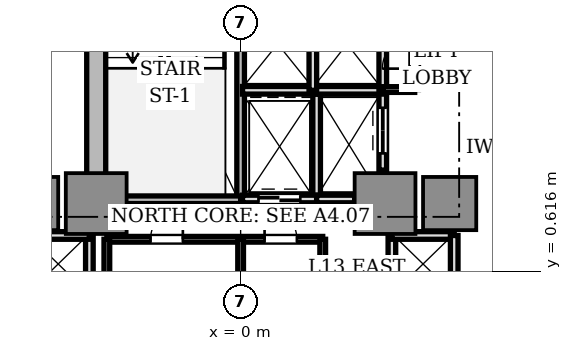
"""IFC4 building model, lengths in metres.
Left out: names, types, materials, properties, quantities, classifications, styles, units other than length and angle.
Written with IfcOpenShell. Run it as: python <this file> out.ifc"""

import sys

from ifc_helpers import new_model, si_unit, direction, frame, frame_2d, origin, origin_2d, place, context, subcontext, project, spatial, rectangle, extrude, source, transform, mapped, element, fill, save


model = new_model("IFC4")
c1 = context("Model", 3, precision=1e-05, world=origin(), true_north=direction((0.0, 1.0)))
c2 = subcontext(c1, "Body", "Model", "MODEL_VIEW")
j1 = project(units=[si_unit("LENGTHUNIT", "METRE"), si_unit("PLANEANGLEUNIT", "RADIAN")], contexts=[c1])
p1 = place(None, origin())
s1 = spatial("IfcSite", under=j1, at=p1, CompositionType="ELEMENT")
p2 = place(p1, origin())
s2 = spatial("IfcBuilding", under=s1, at=p2, CompositionType="ELEMENT")
p3 = place(p2, frame((0.0, 0.0, 51.05)))
s3 = spatial("IfcBuildingStorey", under=s2, at=p3, CompositionType="ELEMENT", Elevation=51.05)
p4 = place(p3, frame((-3.8, 2.85, 0.0), z_axis=(0.0, 0.0, 1.0), x_axis=(0.0, 1.0, 0.0)))
e1 = element("IfcWall", 1, at=p4, inside=s3, PredefinedType="SHEAR", context=c2, shape_type="SweptSolid", body=[
    extrude(rectangle(XDim=6.9, YDim=0.5, at=frame_2d((3.45, 0.0))), origin(), (0.0, 0.0, 1.0), 3.11),
])
m1 = source(origin(), c2, "Body", "SweptSolid", [
    extrude(rectangle(XDim=1.6, YDim=1.6, at=origin_2d()), origin(), (0.0, 0.0, 1.0), 3.11),
])
for number, where, z_axis, x_axis in (
    (2, (-3.8, 2.4, 0.0), (0.0, 0.0, 1.0), (1.0, 0.0, 0.0)),
    (3, (3.8, 2.4, 0.0), (0.0, 0.0, 1.0), (1.0, 0.0, 0.0)),
):
    element("IfcColumn", number, at=place(p3, frame(where, z_axis=z_axis, x_axis=x_axis)), inside=s3, PredefinedType="COLUMN", context=c2, shape_type="MappedRepresentation", body=[
        mapped(m1, transform((0.0, 0.0, 0.0), scale=1.0)),
    ])
m2 = source(origin(), c2, "Body", "SweptSolid", [
    extrude(rectangle(XDim=1.4, YDim=1.4, at=origin_2d()), origin(), (0.0, 0.0, 1.0), 3.11),
])
for number, where, z_axis, x_axis in (
    (4, (5.5, 2.4, 0.0), (0.0, 0.0, 1.0), (1.0, 0.0, 0.0)),
    (5, (-5.5, 2.4, 0.0), (0.0, 0.0, 1.0), (1.0, 0.0, 0.0)),
):
    element("IfcColumn", number, at=place(p3, frame(where, z_axis=z_axis, x_axis=x_axis)), inside=s3, PredefinedType="COLUMN", context=c2, shape_type="MappedRepresentation", body=[
        mapped(m2, transform((0.0, 0.0, 0.0), scale=1.0)),
    ])
p5 = place(p3, frame((0.0, 2.5, 0.0), z_axis=(0.0, 0.0, 1.0), x_axis=(0.0, 1.0, 0.0)))
e6 = element("IfcWall", 6, at=p5, inside=s3, PredefinedType="SOLIDWALL", context=c2, shape_type="SweptSolid", body=[
    extrude(rectangle(XDim=7.68, YDim=0.2, at=frame_2d((3.84, 0.0))), origin(), (0.0, 0.0, 1.0), 3.11),
])
p6 = place(p5, frame((6.5, 0.0, 0.0)))
e7 = element("IfcOpeningElement", 7, at=p6, cuts=e6, PredefinedType="OPENING", context=c2, shape_type="SweptSolid", body=[
    extrude(rectangle(XDim=0.95, YDim=2.15, at=frame_2d((0.475, 1.075))), frame((0.0, 0.11, 0.0), z_axis=(0.0, -1.0, 0.0), x_axis=(1.0, 0.0, 0.0)), (0.0, 0.0, 1.0), 0.22),
])
p7 = place(p3, frame((-3.72, 2.5, 0.0), z_axis=(0.0, 0.0, 1.0), x_axis=(1.0, 0.0, 0.0)))
e8 = element("IfcWall", 8, at=p7, inside=s3, PredefinedType="SOLIDWALL", context=c2, shape_type="SweptSolid", body=[
    extrude(rectangle(XDim=3.72, YDim=0.2, at=frame_2d((1.86, 0.0))), origin(), (0.0, 0.0, 1.0), 3.11),
])
p8 = place(p3, frame((2.0, 2.5, 0.0), z_axis=(0.0, 0.0, 1.0), x_axis=(0.0, 1.0, 0.0)))
e9 = element("IfcWall", 9, at=p8, inside=s3, PredefinedType="SOLIDWALL", context=c2, shape_type="SweptSolid", body=[
    extrude(rectangle(XDim=2.78, YDim=0.2, at=frame_2d((1.39, 0.0))), origin(), (0.0, 0.0, 1.0), 2.66),
])
p9 = place(p3, frame((0.05, 2.52, 0.0), z_axis=(0.0, 0.0, 1.0), x_axis=(1.0, 0.0, 0.0)))
e10 = element("IfcWall", 10, at=p9, inside=s3, PredefinedType="SOLIDWALL", context=c2, shape_type="SweptSolid", body=[
    extrude(rectangle(XDim=1.95, YDim=0.2, at=frame_2d((0.975, 0.0))), origin(), (0.0, 0.0, 1.0), 2.66),
])
p10 = place(p9, frame((0.42, 0.0, 0.0)))
e11 = element("IfcOpeningElement", 11, at=p10, cuts=e10, PredefinedType="OPENING", context=c2, shape_type="SweptSolid", body=[
    extrude(rectangle(XDim=1.1, YDim=2.2, at=frame_2d((0.55, 1.1))), frame((0.0, 0.11, 0.0), z_axis=(0.0, -1.0, 0.0), x_axis=(1.0, 0.0, 0.0)), (0.0, 0.0, 1.0), 0.22),
])
p11 = place(p3, frame((2.0, 2.52, 0.0), z_axis=(0.0, 0.0, 1.0), x_axis=(1.0, 0.0, 0.0)))
e12 = element("IfcWall", 12, at=p11, inside=s3, PredefinedType="SOLIDWALL", context=c2, shape_type="SweptSolid", body=[
    extrude(rectangle(XDim=1.0, YDim=0.2, at=frame_2d((0.5, 0.0))), origin(), (0.0, 0.0, 1.0), 2.66),
])
p12 = place(p3, frame((3.74, 3.28, 0.0), z_axis=(0.0, 0.0, 1.0), x_axis=(0.0, 1.0, 0.0)))
e13 = element("IfcWall", 13, at=p12, inside=s3, PredefinedType="SOLIDWALL", context=c2, shape_type="SweptSolid", body=[
    extrude(rectangle(XDim=2.08, YDim=0.2, at=frame_2d((1.04, 0.0))), origin(), (0.0, 0.0, 1.0), 2.66),
])
p13 = place(p12, frame((0.44, 0.0, 0.0)))
e14 = element("IfcOpeningElement", 14, at=p13, cuts=e13, PredefinedType="OPENING", context=c2, shape_type="SweptSolid", body=[
    extrude(rectangle(XDim=1.2, YDim=2.2, at=frame_2d((0.6, 1.1))), frame((0.0, 0.11, 0.0), z_axis=(0.0, -1.0, 0.0), x_axis=(1.0, 0.0, 0.0)), (0.0, 0.0, 1.0), 0.22),
])
p14 = place(p3, frame((0.05, 5.38, 0.0), z_axis=(0.0, 0.0, 1.0), x_axis=(1.0, 0.0, 0.0)))
e15 = element("IfcWall", 15, at=p14, inside=s3, PredefinedType="SOLIDWALL", context=c2, shape_type="SweptSolid", body=[
    extrude(rectangle(XDim=3.69, YDim=0.2, at=frame_2d((1.845, 0.0))), origin(), (0.0, 0.0, 1.0), 2.66),
])
for number, where, z_axis, x_axis in (
    (16, (1.9, 5.38, 0.0), (0.0, 0.0, 1.0), (0.0, 1.0, 0.0)),
    (17, (3.74, 5.38, 0.0), (0.0, 0.0, 1.0), (0.0, 1.0, 0.0)),
):
    element("IfcWall", number, at=place(p3, frame(where, z_axis=z_axis, x_axis=x_axis)), inside=s3, PredefinedType="SOLIDWALL", context=c2, shape_type="SweptSolid", body=[
        extrude(rectangle(XDim=2.48, YDim=0.2, at=frame_2d((1.24, 0.0))), origin(), (0.0, 0.0, 1.0), 2.66),
    ])
p15 = place(p3, frame((3.98, -1.56, 0.0), z_axis=(0.0, 0.0, 1.0), x_axis=(0.0, 1.0, 0.0)))
e18 = element("IfcWall", 18, at=p15, inside=s3, PredefinedType="SOLIDWALL", context=c2, shape_type="SweptSolid", body=[
    extrude(rectangle(XDim=3.12, YDim=0.2, at=frame_2d((1.56, 0.0))), origin(), (0.0, 0.0, 1.0), 2.18),
])
p16 = place(p3, frame((3.98, 1.56, 0.0), z_axis=(0.0, 0.0, 1.0), x_axis=(1.0, 0.0, 0.0)))
e19 = element("IfcWall", 19, at=p16, inside=s3, PredefinedType="SOLIDWALL", context=c2, shape_type="SweptSolid", body=[
    extrude(rectangle(XDim=1.64, YDim=0.2, at=frame_2d((0.82, 0.0))), origin(), (0.0, 0.0, 1.0), 2.66),
])
p17 = place(p3, frame((5.62, 0.0, 0.0), z_axis=(0.0, 0.0, 1.0), x_axis=(0.0, 1.0, 0.0)))
e20 = element("IfcWall", 20, at=p17, inside=s3, PredefinedType="SOLIDWALL", context=c2, shape_type="SweptSolid", body=[
    extrude(rectangle(XDim=1.56, YDim=0.2, at=frame_2d((0.78, 0.0))), origin(), (0.0, 0.0, 1.0), 2.66),
])
p18 = place(p3, frame((-3.98, -1.56, 0.0), z_axis=(0.0, 0.0, 1.0), x_axis=(0.0, 1.0, 0.0)))
e21 = element("IfcWall", 21, at=p18, inside=s3, PredefinedType="SOLIDWALL", context=c2, shape_type="SweptSolid", body=[
    extrude(rectangle(XDim=3.12, YDim=0.2, at=frame_2d((1.56, 0.0))), origin(), (0.0, 0.0, 1.0), 2.18),
])
p19 = place(p3, frame((-5.62, 1.56, 0.0), z_axis=(0.0, 0.0, 1.0), x_axis=(1.0, 0.0, 0.0)))
e22 = element("IfcWall", 22, at=p19, inside=s3, PredefinedType="SOLIDWALL", context=c2, shape_type="SweptSolid", body=[
    extrude(rectangle(XDim=1.64, YDim=0.2, at=frame_2d((0.82, 0.0))), origin(), (0.0, 0.0, 1.0), 2.66),
])
p20 = place(p3, frame((4.58, 5.4, 0.0), z_axis=(0.0, 0.0, 1.0), x_axis=(0.0, 1.0, 0.0)))
e23 = element("IfcWall", 23, at=p20, inside=s3, PredefinedType="SOLIDWALL", context=c2, shape_type="SweptSolid", body=[
    extrude(rectangle(XDim=2.46, YDim=0.2, at=frame_2d((1.23, 0.0))), origin(), (0.0, 0.0, 1.0), 2.66),
])
p21 = place(p20, frame((0.55, 0.0, 0.0)))
e24 = element("IfcOpeningElement", 24, at=p21, cuts=e23, PredefinedType="OPENING", context=c2, shape_type="SweptSolid", body=[
    extrude(rectangle(XDim=0.85, YDim=2.1, at=frame_2d((0.425, 1.05))), frame((0.0, 0.11, 0.0), z_axis=(0.0, -1.0, 0.0), x_axis=(1.0, 0.0, 0.0)), (0.0, 0.0, 1.0), 0.22),
])
p22 = place(p3, frame((3.74, 5.4, 0.0), z_axis=(0.0, 0.0, 1.0), x_axis=(1.0, 0.0, 0.0)))
e25 = element("IfcWall", 25, at=p22, inside=s3, PredefinedType="PARTITIONING", context=c2, shape_type="SweptSolid", body=[
    extrude(rectangle(XDim=0.84, YDim=0.15, at=frame_2d((0.42, 0.0))), origin(), (0.0, 0.0, 1.0), 2.66),
])
p23 = place(p3, frame((-3.52, 1.46, 0.0), z_axis=(0.0, 0.0, 1.0), x_axis=(1.0, 0.0, 0.0)))
e26 = element("IfcWall", 26, at=p23, inside=s3, PredefinedType="PARTITIONING", context=c2, shape_type="SweptSolid", body=[
    extrude(rectangle(XDim=5.68, YDim=0.15, at=frame_2d((2.84, 0.0))), origin(), (0.0, 0.0, 1.0), 2.66),
])
p24 = place(p23, frame((1.15, 0.0, 0.0)))
e27 = element("IfcOpeningElement", 27, at=p24, cuts=e26, PredefinedType="OPENING", context=c2, shape_type="SweptSolid", body=[
    extrude(rectangle(XDim=0.85, YDim=2.1, at=frame_2d((0.425, 1.05))), frame((0.0, 0.085, 0.0), z_axis=(0.0, -1.0, 0.0), x_axis=(1.0, 0.0, 0.0)), (0.0, 0.0, 1.0), 0.17),
])
p25 = place(p23, frame((4.15, 0.0, 0.0)))
e28 = element("IfcOpeningElement", 28, at=p25, cuts=e26, PredefinedType="OPENING", context=c2, shape_type="SweptSolid", body=[
    extrude(rectangle(XDim=0.85, YDim=2.1, at=frame_2d((0.425, 1.05))), frame((0.0, 0.085, 0.0), z_axis=(0.0, -1.0, 0.0), x_axis=(1.0, 0.0, 0.0)), (0.0, 0.0, 1.0), 0.17),
])
p26 = place(p3, frame((-3.52, 0.1, 0.0), z_axis=(0.0, 0.0, 1.0), x_axis=(0.0, 1.0, 0.0)))
e29 = element("IfcWall", 29, at=p26, inside=s3, PredefinedType="PARTITIONING", context=c2, shape_type="SweptSolid", body=[
    extrude(rectangle(XDim=1.36, YDim=0.15, at=frame_2d((0.68, 0.0))), origin(), (0.0, 0.0, 1.0), 2.18),
])
for number, where, z_axis, x_axis in (
    (30, (2.16, 0.1, 0.0), (0.0, 0.0, 1.0), (0.0, 1.0, 0.0)),
    (31, (0.0, 0.1, 0.0), (0.0, 0.0, 1.0), (0.0, 1.0, 0.0)),
):
    element("IfcWall", number, at=place(p3, frame(where, z_axis=z_axis, x_axis=x_axis)), inside=s3, PredefinedType="PARTITIONING", context=c2, shape_type="SweptSolid", body=[
        extrude(rectangle(XDim=1.36, YDim=0.15, at=frame_2d((0.68, 0.0))), origin(), (0.0, 0.0, 1.0), 2.66),
    ])
m3 = source(origin(), c2, "Body", "SweptSolid", [
    extrude(rectangle(XDim=1.1, YDim=0.05, at=origin_2d()), origin(), (0.0, 0.0, 1.0), 2.2),
])
p27 = place(p10, frame((0.55, 0.0, 0.0)))
e32 = element("IfcDoor", 32, at=p27, inside=s3, OperationType="DOUBLE_DOOR_SLIDING", PredefinedType="DOOR", context=c2, shape_type="MappedRepresentation", body=[
    mapped(m3, transform((0.0, 0.0, 0.0), scale=1.0)),
])
fill(e11, e32)
m4 = source(origin(), c2, "Body", "SweptSolid", [
    extrude(rectangle(XDim=1.2, YDim=0.05, at=origin_2d()), origin(), (0.0, 0.0, 1.0), 2.2),
])
p28 = place(p13, frame((0.6, 0.0, 0.0)))
e33 = element("IfcDoor", 33, at=p28, inside=s3, OperationType="DOUBLE_DOOR_SLIDING", PredefinedType="DOOR", context=c2, shape_type="MappedRepresentation", body=[
    mapped(m4, transform((0.0, 0.0, 0.0), scale=1.0)),
])
fill(e14, e33)
m5 = source(origin(), c2, "Body", "SweptSolid", [
    extrude(rectangle(XDim=0.85, YDim=0.05, at=origin_2d()), origin(), (0.0, 0.0, 1.0), 2.1),
])
p29 = place(p21, frame((0.425, 0.0, 0.0)))
e34 = element("IfcDoor", 34, at=p29, inside=s3, OperationType="SINGLE_SWING_LEFT", PredefinedType="DOOR", context=c2, shape_type="MappedRepresentation", body=[
    mapped(m5, transform((0.0, 0.0, 0.0), scale=1.0)),
])
fill(e24, e34)
p30 = place(p24, frame((0.425, 0.0, 0.0)))
e35 = element("IfcDoor", 35, at=p30, inside=s3, OperationType="SINGLE_SWING_RIGHT", PredefinedType="DOOR", context=c2, shape_type="MappedRepresentation", body=[
    mapped(m5, transform((0.0, 0.0, 0.0), scale=1.0)),
])
fill(e27, e35)
p31 = place(p25, frame((0.425, 0.0, 0.0)))
e36 = element("IfcDoor", 36, at=p31, inside=s3, OperationType="SINGLE_SWING_LEFT", PredefinedType="DOOR", context=c2, shape_type="MappedRepresentation", body=[
    mapped(m5, transform((0.0, 0.0, 0.0), scale=1.0)),
])
fill(e28, e36)
save(model, sys.argv[1])
